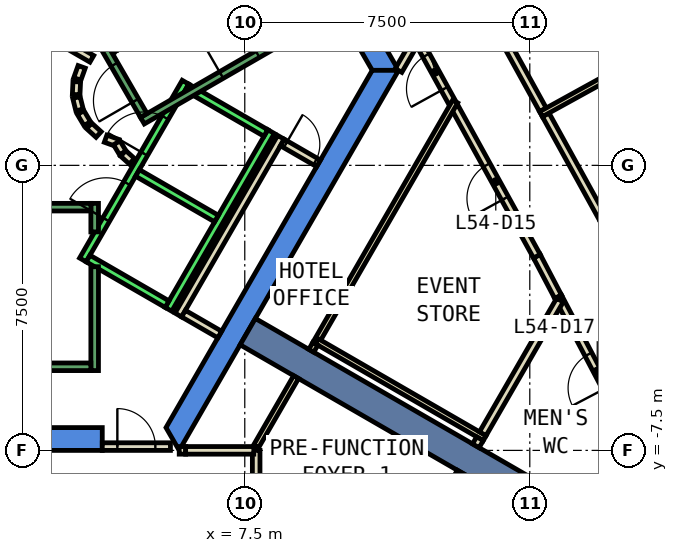
"""IFC4 building model, lengths in metres.
Left out: names, types, materials, properties, quantities, classifications, styles, units other than length and angle.
Written with IfcOpenShell. Run it as: python <this file> out.ifc"""

import sys

from ifc_helpers import new_model, si_unit, direction, frame, frame_2d, origin, place, context, subcontext, project, spatial, polyline, rectangle, outline, extrude, element, fill, save


model = new_model("IFC4")
c1 = context("Model", 3, precision=1e-05, world=origin(), true_north=direction((0.0, 1.0)))
c2 = subcontext(c1, "Body", "Model", "MODEL_VIEW")
j1 = project(units=[si_unit("LENGTHUNIT", "METRE"), si_unit("PLANEANGLEUNIT", "RADIAN")], contexts=[c1])
p1 = place(None, origin())
s1 = spatial("IfcSite", under=j1, at=p1, CompositionType="ELEMENT")
p2 = place(p1, origin())
s2 = spatial("IfcBuilding", under=s1, at=p2, CompositionType="ELEMENT")
p3 = place(p2, frame((0.0, 0.0, 241.4)))
s3 = spatial("IfcBuildingStorey", under=s2, at=p3, CompositionType="ELEMENT", Elevation=241.4)
p4 = place(p3, frame((0.0, 0.0, -0.6)))
e1 = element("IfcWall", 1, at=p4, inside=s3, PredefinedType="SHEAR", context=c2, shape_type="SweptSolid", body=[
    extrude(outline(polyline([(6.786, 10.747), (6.266, 10.447), (10.854, 2.5), (11.547, 2.5), (6.786, 10.747)])), origin(), (0.0, 0.0, 1.0), 3.86),
])
p5 = place(p3, frame((0.0, 0.0, -0.6)))
e2 = element("IfcWall", 2, at=p5, inside=s3, PredefinedType="SHEAR", context=c2, shape_type="SweptSolid", body=[
    extrude(outline(polyline([(3.75, -7.5), (3.75, -6.9), (-5.427, -6.9), (-5.774, -7.5), (3.75, -7.5)])), origin(), (0.0, 0.0, 1.0), 3.86),
])
p6 = place(p3, frame((0.0, 0.0, -0.6)))
e3 = element("IfcWall", 3, at=p6, inside=s3, PredefinedType="SHEAR", context=c2, shape_type="SweptSolid", body=[
    extrude(outline(polyline([(5.774, -7.5), (11.547, 2.5), (10.854, 2.5), (5.427, -6.9), (5.774, -7.5)])), origin(), (0.0, 0.0, 1.0), 3.86),
])
p7 = place(p3, frame((7.578, -4.375, -0.6), z_axis=(0.0, 0.0, 1.0), x_axis=(0.866024315419, -0.5000018851, 0.0)))
e4 = element("IfcWall", 4, at=p7, inside=s3, PredefinedType="SHEAR", context=c2, shape_type="SweptSolid", body=[
    extrude(rectangle(XDim=9.0, YDim=0.8, at=frame_2d((4.5, 0.0))), origin(), (0.0, 0.0, 1.0), 3.86),
])
p8 = place(p3, frame((12.952, 1.661, 0.0), z_axis=(0.0, 0.0, 1.0), x_axis=(-0.482707835392, 0.875781448566, 0.0)))
e5 = element("IfcWall", 5, at=p8, inside=s3, PredefinedType="PARTITIONING", context=c2, shape_type="SweptSolid", body=[
    extrude(rectangle(XDim=1.817, YDim=0.2, at=frame_2d((0.908, 0.0))), origin(), (0.0, 0.0, 1.0), 3.26),
])
p9 = place(p8, frame((0.408, 0.0, 0.0)))
e6 = element("IfcOpeningElement", 6, at=p9, cuts=e5, PredefinedType="OPENING", context=c2, shape_type="SweptSolid", body=[
    extrude(rectangle(XDim=1.0, YDim=2.1, at=frame_2d((0.5, 1.05))), frame((0.0, 0.11, 0.0), z_axis=(0.0, -1.0, 0.0), x_axis=(1.0, 0.0, 0.0)), (0.0, 0.0, 1.0), 0.22),
])
p10 = place(p3, frame((12.079, 3.419, 0.0), z_axis=(0.0, 0.0, 1.0), x_axis=(-0.500674759037, -0.865635480825, 0.0)))
e7 = element("IfcWall", 7, at=p10, inside=s3, PredefinedType="PARTITIONING", context=c2, shape_type="SweptSolid", body=[
    extrude(rectangle(XDim=1.065, YDim=0.2, at=frame_2d((0.532, 0.0))), origin(), (0.0, 0.0, 1.0), 3.26),
])
p11 = place(p3, frame((15.746, -3.458, 0.0), z_axis=(0.0, 0.0, 1.0), x_axis=(-0.464794189951, 0.885418748948, 0.0)))
e8 = element("IfcWall", 8, at=p11, inside=s3, PredefinedType="PARTITIONING", context=c2, shape_type="SweptSolid", body=[
    extrude(rectangle(XDim=1.205, YDim=0.2, at=frame_2d((0.603, 0.0))), origin(), (0.0, 0.0, 1.0), 3.26),
])
p12 = place(p3, frame((15.186, -2.391, 0.0), z_axis=(0.0, 0.0, 1.0), x_axis=(-0.482858240592, 0.875698532311, 0.0)))
e9 = element("IfcWall", 9, at=p12, inside=s3, PredefinedType="PARTITIONING", context=c2, shape_type="SweptSolid", body=[
    extrude(rectangle(XDim=4.478, YDim=0.2, at=frame_2d((2.239, 0.0))), origin(), (0.0, 0.0, 1.0), 3.26),
])
p13 = place(p12, frame((1.739, 0.0, 0.0)))
e10 = element("IfcOpeningElement", 10, at=p13, cuts=e9, PredefinedType="OPENING", context=c2, shape_type="SweptSolid", body=[
    extrude(rectangle(XDim=1.0, YDim=2.1, at=frame_2d((0.5, 1.05))), frame((0.0, 0.11, 0.0), z_axis=(0.0, -1.0, 0.0), x_axis=(1.0, 0.0, 0.0)), (0.0, 0.0, 1.0), 0.22),
])
p14 = place(p3, frame((17.804, -7.374, 0.0), z_axis=(0.0, 0.0, 1.0), x_axis=(-0.465179971699, 0.885216128372, 0.0)))
e11 = element("IfcWall", 11, at=p14, inside=s3, PredefinedType="PARTITIONING", context=c2, shape_type="SweptSolid", body=[
    extrude(rectangle(XDim=4.424, YDim=0.2, at=frame_2d((2.212, 0.0))), origin(), (0.0, 0.0, 1.0), 3.26),
])
p15 = place(p14, frame((1.712, 0.0, 0.0)))
e12 = element("IfcOpeningElement", 12, at=p15, cuts=e11, PredefinedType="OPENING", context=c2, shape_type="SweptSolid", body=[
    extrude(rectangle(XDim=1.0, YDim=2.1, at=frame_2d((0.5, 1.05))), frame((0.0, 0.11, 0.0), z_axis=(0.0, -1.0, 0.0), x_axis=(1.0, 0.0, 0.0)), (0.0, 0.0, 1.0), 0.22),
])
p16 = place(p3, frame((15.418, 1.33, 0.0), z_axis=(0.0, 0.0, 1.0), x_axis=(0.482838875149, -0.875709210095, 0.0)))
e13 = element("IfcWall", 13, at=p16, inside=s3, PredefinedType="PARTITIONING", context=c2, shape_type="SweptSolid", body=[
    extrude(rectangle(XDim=3.167, YDim=0.2, at=frame_2d((1.583, 0.0))), origin(), (0.0, 0.0, 1.0), 3.26),
])
p17 = place(p3, frame((13.817, 4.234, 0.0), z_axis=(0.0, 0.0, 1.0), x_axis=(0.482871474341, -0.875691235121, 0.0)))
e14 = element("IfcWall", 14, at=p17, inside=s3, PredefinedType="PARTITIONING", context=c2, shape_type="SweptSolid", body=[
    extrude(rectangle(XDim=3.167, YDim=0.2, at=frame_2d((1.583, 0.0))), origin(), (0.0, 0.0, 1.0), 3.26),
])
p18 = place(p3, frame((5.751, -3.938, 0.0), z_axis=(0.0, 0.0, 1.0), x_axis=(0.500034260056, 0.866005622828, 0.0)))
e15 = element("IfcWall", 15, at=p18, inside=s3, PredefinedType="PARTITIONING", context=c2, shape_type="SweptSolid", body=[
    extrude(rectangle(XDim=5.399, YDim=0.2, at=frame_2d((2.7, 0.0))), origin(), (0.0, 0.0, 1.0), 3.26),
])
p19 = place(p3, frame((8.488, 0.602, 0.0), z_axis=(0.0, 0.0, 1.0), x_axis=(0.866063652425, -0.499933745558, 0.0)))
e16 = element("IfcWall", 16, at=p19, inside=s3, PredefinedType="PARTITIONING", context=c2, shape_type="SweptSolid", body=[
    extrude(rectangle(XDim=1.1, YDim=0.2, at=frame_2d((0.55, 0.0))), origin(), (0.0, 0.0, 1.0), 3.26),
])
p20 = place(p19, frame((0.1, 0.0, 0.0)))
e17 = element("IfcOpeningElement", 17, at=p20, cuts=e16, PredefinedType="OPENING", context=c2, shape_type="SweptSolid", body=[
    extrude(rectangle(XDim=0.9, YDim=2.1, at=frame_2d((0.45, 1.05))), frame((0.0, 0.11, 0.0), z_axis=(0.0, -1.0, 0.0), x_axis=(1.0, 0.0, 0.0)), (0.0, 0.0, 1.0), 0.22),
])
p21 = place(p3, frame((6.841, -4.452, 0.0), z_axis=(0.0, 0.0, 1.0), x_axis=(-0.86621513555, 0.499671230855, 0.0)))
e18 = element("IfcWall", 18, at=p21, inside=s3, PredefinedType="PARTITIONING", context=c2, shape_type="SweptSolid", body=[
    extrude(rectangle(XDim=1.1, YDim=0.2, at=frame_2d((0.55, 0.0))), origin(), (0.0, 0.0, 1.0), 3.26),
])
p22 = place(p3, frame((5.775, -7.499, 0.0), z_axis=(0.0, 0.0, 1.0), x_axis=(1.0, 0.0, 0.0)))
e19 = element("IfcWall", 19, at=p22, inside=s3, PredefinedType="PARTITIONING", context=c2, shape_type="SweptSolid", body=[
    extrude(rectangle(XDim=0.169, YDim=0.2, at=frame_2d((0.084, 0.0))), origin(), (0.0, 0.0, 1.0), 2.4),
])
p23 = place(p3, frame((7.8, -7.39, 0.0), z_axis=(0.0, 0.0, 1.0), x_axis=(0.499977374825, 0.866038466041, 0.0)))
e20 = element("IfcWall", 20, at=p23, inside=s3, PredefinedType="PARTITIONING", context=c2, shape_type="SweptSolid", body=[
    extrude(rectangle(XDim=2.1, YDim=0.15, at=frame_2d((1.05, 0.0))), origin(), (0.0, 0.0, 1.0), 3.26),
])
p24 = place(p3, frame((9.358, -4.692, 0.0), z_axis=(0.0, 0.0, 1.0), x_axis=(0.500027777314, 0.866009365951, 0.0)))
e21 = element("IfcWall", 21, at=p24, inside=s3, PredefinedType="PARTITIONING", context=c2, shape_type="SweptSolid", body=[
    extrude(rectangle(XDim=7.36, YDim=0.15, at=frame_2d((3.68, 0.0))), origin(), (0.0, 0.0, 1.0), 3.26),
])
p25 = place(p3, frame((1.866, 3.732, 0.0), z_axis=(0.0, 0.0, 1.0), x_axis=(0.866043361281, -0.499968895414, 0.0)))
e22 = element("IfcWall", 22, at=p25, inside=s3, PredefinedType="PARTITIONING", context=c2, shape_type="SweptSolid", body=[
    extrude(rectangle(XDim=1.858, YDim=0.2, at=frame_2d((0.929, 0.0))), origin(), (0.0, 0.0, 1.0), 3.26),
])
p26 = place(p3, frame((3.208, 2.592, 0.0), z_axis=(0.0, 0.0, 1.0), x_axis=(-0.337388820924, -0.941365382578, 0.0)))
e23 = element("IfcWall", 23, at=p26, inside=s3, PredefinedType="PARTITIONING", context=c2, shape_type="SweptSolid", body=[
    extrude(rectangle(XDim=0.338, YDim=0.2, at=frame_2d((0.169, 0.0))), origin(), (0.0, 0.0, 1.0), 3.26),
])
p27 = place(p3, frame((3.079, 2.199, 0.0), z_axis=(0.0, 0.0, 1.0), x_axis=(-0.047771483479, -0.998858290933, 0.0)))
e24 = element("IfcWall", 24, at=p27, inside=s3, PredefinedType="PARTITIONING", context=c2, shape_type="SweptSolid", body=[
    extrude(rectangle(XDim=0.337, YDim=0.2, at=frame_2d((0.169, 0.0))), origin(), (0.0, 0.0, 1.0), 3.26),
])
p28 = place(p3, frame((3.07, 1.786, 0.0), z_axis=(0.0, 0.0, 1.0), x_axis=(0.242705583207, -0.970099994784, 0.0)))
e25 = element("IfcWall", 25, at=p28, inside=s3, PredefinedType="PARTITIONING", context=c2, shape_type="SweptSolid", body=[
    extrude(rectangle(XDim=0.338, YDim=0.2, at=frame_2d((0.169, 0.0))), origin(), (0.0, 0.0, 1.0), 3.26),
])
for number, where, z_axis, x_axis in (
    (26, (3.182, 1.388, 0.0), (0.0, 0.0, 1.0), (0.512, -0.859, 0.0)),
    (27, (3.404, 1.039, 0.0), (0.0, 0.0, 1.0), (0.74, -0.672, 0.0)),
):
    element("IfcWall", number, at=place(p3, frame(where, z_axis=z_axis, x_axis=x_axis)), inside=s3, PredefinedType="PARTITIONING", context=c2, shape_type="SweptSolid", body=[
        extrude(rectangle(XDim=0.338, YDim=0.2, at=frame_2d((0.169, 0.0))), origin(), (0.0, 0.0, 1.0), 3.26),
    ])
p29 = place(p3, frame((3.838, 0.702, 0.0), z_axis=(0.0, 0.0, 1.0), x_axis=(0.941035081519, -0.338308993895, 0.0)))
e28 = element("IfcWall", 28, at=p29, inside=s3, PredefinedType="PARTITIONING", context=c2, shape_type="SweptSolid", body=[
    extrude(rectangle(XDim=0.337, YDim=0.2, at=frame_2d((0.168, 0.0))), origin(), (0.0, 0.0, 1.0), 3.26),
])
p30 = place(p3, frame((4.132, 0.593, 0.0), z_axis=(0.0, 0.0, 1.0), x_axis=(0.513561617048, -0.858052717201, 0.0)))
e29 = element("IfcWall", 29, at=p30, inside=s3, PredefinedType="PARTITIONING", context=c2, shape_type="SweptSolid", body=[
    extrude(rectangle(XDim=0.308, YDim=0.2, at=frame_2d((0.154, 0.0))), origin(), (0.0, 0.0, 1.0), 3.26),
])
p31 = place(p3, frame((4.301, 0.315, 0.0), z_axis=(0.0, 0.0, 1.0), x_axis=(0.741798017506, -0.670623367639, 0.0)))
e30 = element("IfcWall", 30, at=p31, inside=s3, PredefinedType="PARTITIONING", context=c2, shape_type="SweptSolid", body=[
    extrude(rectangle(XDim=0.309, YDim=0.2, at=frame_2d((0.154, 0.0))), origin(), (0.0, 0.0, 1.0), 3.26),
])
p32 = place(p3, frame((7.8, -7.499, 0.0), z_axis=(0.0, 0.0, 1.0), x_axis=(0.0, -1.0, 0.0)))
e31 = element("IfcWall", 31, at=p32, inside=s3, PredefinedType="PARTITIONING", context=c2, shape_type="SweptSolid", body=[
    extrude(rectangle(XDim=4.604, YDim=0.2, at=frame_2d((2.302, 0.0))), origin(), (0.0, 0.0, 1.0), 3.26),
])
p33 = place(p32, frame((1.802, 0.0, 0.0)))
e32 = element("IfcOpeningElement", 32, at=p33, cuts=e31, PredefinedType="OPENING", context=c2, shape_type="SweptSolid", body=[
    extrude(rectangle(XDim=1.0, YDim=2.1, at=frame_2d((0.5, 1.05))), frame((0.0, 0.11, 0.0), z_axis=(0.0, -1.0, 0.0), x_axis=(1.0, 0.0, 0.0)), (0.0, 0.0, 1.0), 0.22),
])
p34 = place(p3, frame((9.395, -4.627, 0.0), z_axis=(0.0, 0.0, 1.0), x_axis=(0.866034131428, -0.499984882974, 0.0)))
e33 = element("IfcWall", 33, at=p34, inside=s3, PredefinedType="PARTITIONING", context=c2, shape_type="SweptSolid", body=[
    extrude(rectangle(XDim=5.1, YDim=0.15, at=frame_2d((2.55, 0.0))), origin(), (0.0, 0.0, 1.0), 3.26),
])
p35 = place(p3, frame((13.18, -8.071, 0.0), z_axis=(0.0, 0.0, 1.0), x_axis=(-0.499914724673, -0.86607463192, 0.0)))
e34 = element("IfcWall", 34, at=p35, inside=s3, PredefinedType="PARTITIONING", context=c2, shape_type="SweptSolid", body=[
    extrude(rectangle(XDim=4.507, YDim=0.2, at=frame_2d((2.253, 0.0))), origin(), (0.0, 0.0, 1.0), 3.26),
])
p36 = place(p3, frame((13.688, -7.192, 0.0), z_axis=(0.0, 0.0, 1.0), x_axis=(-0.499787711288, -0.866147934042, 0.0)))
e35 = element("IfcWall", 35, at=p36, inside=s3, PredefinedType="PARTITIONING", context=c2, shape_type="SweptSolid", body=[
    extrude(rectangle(XDim=0.216, YDim=0.2, at=frame_2d((0.108, 0.0))), origin(), (0.0, 0.0, 1.0), 3.26),
])
p37 = place(p3, frame((15.793, -3.546, 0.0), z_axis=(0.0, 0.0, 1.0), x_axis=(-0.500000064182, -0.866025366729, 0.0)))
e36 = element("IfcWall", 36, at=p37, inside=s3, PredefinedType="PARTITIONING", context=c2, shape_type="SweptSolid", body=[
    extrude(rectangle(XDim=4.06, YDim=0.2, at=frame_2d((2.03, 0.0))), origin(), (0.0, 0.0, 1.0), 3.26),
])
p38 = place(p3, frame((15.295, 1.347, 0.0), z_axis=(0.0, 0.0, 1.0), x_axis=(0.875728645362, 0.482803624358, 0.0)))
e37 = element("IfcWall", 37, at=p38, inside=s3, PredefinedType="PARTITIONING", context=c2, shape_type="SweptSolid", body=[
    extrude(rectangle(XDim=5.4, YDim=0.15, at=frame_2d((2.7, 0.0))), origin(), (0.0, 0.0, 1.0), 3.26),
])
p39 = place(p3, frame((3.75, -7.4, 0.0), z_axis=(0.0, 0.0, 1.0), x_axis=(1.0, 0.0, 0.0)))
e38 = element("IfcWall", 38, at=p39, inside=s3, PredefinedType="PARTITIONING", context=c2, shape_type="SweptSolid", body=[
    extrude(rectangle(XDim=1.794, YDim=0.2, at=frame_2d((0.897, 0.0))), origin(), (0.0, 0.0, 1.0), 2.4),
])
p40 = place(p39, frame((0.397, 0.0, 0.0)))
e39 = element("IfcOpeningElement", 39, at=p40, cuts=e38, PredefinedType="OPENING", context=c2, shape_type="SweptSolid", body=[
    extrude(rectangle(XDim=1.0, YDim=2.1, at=frame_2d((0.5, 1.05))), frame((0.0, 0.11, 0.0), z_axis=(0.0, -1.0, 0.0), x_axis=(1.0, 0.0, 0.0)), (0.0, 0.0, 1.0), 0.22),
])
p41 = place(p3, frame((9.25, -4.879, 0.0), z_axis=(0.0, 0.0, 1.0), x_axis=(0.499787711288, 0.866147934042, 0.0)))
e40 = element("IfcWall", 40, at=p41, inside=s3, PredefinedType="PARTITIONING", context=c2, shape_type="SweptSolid", body=[
    extrude(rectangle(XDim=0.216, YDim=0.15, at=frame_2d((0.108, 0.0))), origin(), (0.0, 0.0, 1.0), 3.26),
])
p42 = place(p3, frame((5.944, -7.499, 0.0), z_axis=(0.0, 0.0, 1.0), x_axis=(1.0, 0.0, 0.0)))
e41 = element("IfcWall", 41, at=p42, inside=s3, PredefinedType="PARTITIONING", context=c2, shape_type="SweptSolid", body=[
    extrude(rectangle(XDim=1.793, YDim=0.2, at=frame_2d((0.896, 0.0))), origin(), (0.0, 0.0, 1.0), 3.26),
])
p43 = place(p3, frame((3.24, -2.488, 0.0), z_axis=(0.0, 0.0, 1.0), x_axis=(0.500034260056, 0.866005622828, 0.0)))
e42 = element("IfcWall", 42, at=p43, inside=s3, PredefinedType="STANDARD", context=c2, shape_type="SweptSolid", body=[
    extrude(rectangle(XDim=5.399, YDim=0.2, at=frame_2d((2.7, 0.0))), origin(), (0.0, 0.0, 1.0), 3.26),
])
p44 = place(p43, frame((3.225, 0.0, 0.0)))
e43 = element("IfcOpeningElement", 43, at=p44, cuts=e42, PredefinedType="OPENING", context=c2, shape_type="SweptSolid", body=[
    extrude(rectangle(XDim=1.1, YDim=2.1, at=frame_2d((0.55, 1.05))), frame((0.0, 0.11, 0.0), z_axis=(0.0, -1.0, 0.0), x_axis=(1.0, 0.0, 0.0)), (0.0, 0.0, 1.0), 0.22),
])
p45 = place(p43, frame((1.225, 0.0, 0.0)))
e44 = element("IfcOpeningElement", 44, at=p45, cuts=e42, PredefinedType="OPENING", context=c2, shape_type="SweptSolid", body=[
    extrude(rectangle(XDim=1.1, YDim=2.1, at=frame_2d((0.55, 1.05))), frame((0.0, 0.11, 0.0), z_axis=(0.0, -1.0, 0.0), x_axis=(1.0, 0.0, 0.0)), (0.0, 0.0, 1.0), 0.22),
])
p46 = place(p3, frame((5.492, -3.788, 0.0), z_axis=(0.0, 0.0, 1.0), x_axis=(0.500034260056, 0.866005622828, 0.0)))
e45 = element("IfcWall", 45, at=p46, inside=s3, PredefinedType="STANDARD", context=c2, shape_type="SweptSolid", body=[
    extrude(rectangle(XDim=5.399, YDim=0.2, at=frame_2d((2.7, 0.0))), origin(), (0.0, 0.0, 1.0), 3.26),
])
p47 = place(p3, frame((3.377, -2.452, 0.0), z_axis=(0.0, 0.0, 1.0), x_axis=(0.865955154139, -0.50012165622, 0.0)))
e46 = element("IfcWall", 46, at=p47, inside=s3, PredefinedType="STANDARD", context=c2, shape_type="SweptSolid", body=[
    extrude(rectangle(XDim=2.4, YDim=0.2, at=frame_2d((1.2, 0.0))), origin(), (0.0, 0.0, 1.0), 3.26),
])
for number, where, z_axis, x_axis in (
    (47, (4.677, -0.2, 0.0), (0.0, 0.0, 1.0), (0.866, -0.5, 0.0)),
    (48, (5.977, 2.052, 0.0), (0.0, 0.0, 1.0), (0.866, -0.5, 0.0)),
):
    element("IfcWall", number, at=place(p3, frame(where, z_axis=z_axis, x_axis=x_axis)), inside=s3, PredefinedType="STANDARD", context=c2, shape_type="SweptSolid", body=[
        extrude(rectangle(XDim=2.399, YDim=0.2, at=frame_2d((1.2, 0.0))), origin(), (0.0, 0.0, 1.0), 3.26),
    ])
p48 = place(p3, frame((3.55, -2.667, 0.0), z_axis=(0.0, 0.0, 1.0), x_axis=(0.0, -1.0, 0.0)))
e49 = element("IfcWall", 49, at=p48, inside=s3, PredefinedType="STANDARD", context=c2, shape_type="SweptSolid", body=[
    extrude(rectangle(XDim=2.733, YDim=0.2, at=frame_2d((1.366, 0.0))), origin(), (0.0, 0.0, 1.0), 3.26),
])
p49 = place(p3, frame((3.55, -1.0, 0.0), z_axis=(0.0, 0.0, 1.0), x_axis=(0.0, -1.0, 0.0)))
e50 = element("IfcWall", 50, at=p49, inside=s3, PredefinedType="STANDARD", context=c2, shape_type="SweptSolid", body=[
    extrude(rectangle(XDim=0.751, YDim=0.2, at=frame_2d((0.375, 0.0))), origin(), (0.0, 0.0, 1.0), 3.26),
])
p50 = place(p3, frame((-3.45, -1.1, 0.0), z_axis=(0.0, 0.0, 1.0), x_axis=(1.0, 0.0, 0.0)))
e51 = element("IfcWall", 51, at=p50, inside=s3, PredefinedType="STANDARD", context=c2, shape_type="SweptSolid", body=[
    extrude(rectangle(XDim=6.9, YDim=0.2, at=frame_2d((3.45, 0.0))), origin(), (0.0, 0.0, 1.0), 3.26),
])
p51 = place(p50, frame((0.45, 0.0, 0.0)))
e52 = element("IfcOpeningElement", 52, at=p51, cuts=e51, PredefinedType="OPENING", context=c2, shape_type="SweptSolid", body=[
    extrude(rectangle(XDim=1.1, YDim=2.2, at=frame_2d((0.55, 1.1))), frame((0.0, 0.11, 0.0), z_axis=(0.0, -1.0, 0.0), x_axis=(1.0, 0.0, 0.0)), (0.0, 0.0, 1.0), 0.22),
])
p52 = place(p3, frame((-3.45, -5.3, 0.0), z_axis=(0.0, 0.0, 1.0), x_axis=(1.0, 0.0, 0.0)))
e53 = element("IfcWall", 53, at=p52, inside=s3, PredefinedType="STANDARD", context=c2, shape_type="SweptSolid", body=[
    extrude(rectangle(XDim=6.9, YDim=0.2, at=frame_2d((3.45, 0.0))), origin(), (0.0, 0.0, 1.0), 3.26),
])
p53 = place(p3, frame((4.806, 1.176, 0.0), z_axis=(0.0, 0.0, 1.0), x_axis=(0.866059941101, 0.499940174841, 0.0)))
e54 = element("IfcWall", 54, at=p53, inside=s3, PredefinedType="STANDARD", context=c2, shape_type="SweptSolid", body=[
    extrude(rectangle(XDim=4.4, YDim=0.2, at=frame_2d((2.2, 0.0))), origin(), (0.0, 0.0, 1.0), 3.26),
])
p54 = place(p53, frame((2.4, 0.0, 0.0)))
e55 = element("IfcOpeningElement", 55, at=p54, cuts=e54, PredefinedType="OPENING", context=c2, shape_type="SweptSolid", body=[
    extrude(rectangle(XDim=1.1, YDim=2.2, at=frame_2d((0.55, 1.1))), frame((0.0, 0.11, 0.0), z_axis=(0.0, -1.0, 0.0), x_axis=(1.0, 0.0, 0.0)), (0.0, 0.0, 1.0), 0.22),
])
p55 = place(p3, frame((4.843, 1.312, 0.0), z_axis=(0.0, 0.0, 1.0), x_axis=(-0.499963383562, 0.866046543262, 0.0)))
e56 = element("IfcWall", 56, at=p55, inside=s3, PredefinedType="STANDARD", context=c2, shape_type="SweptSolid", body=[
    extrude(rectangle(XDim=6.9, YDim=0.2, at=frame_2d((3.45, 0.0))), origin(), (0.0, 0.0, 1.0), 3.26),
])
p56 = place(p55, frame((0.45, 0.0, 0.0)))
e57 = element("IfcOpeningElement", 57, at=p56, cuts=e56, PredefinedType="OPENING", context=c2, shape_type="SweptSolid", body=[
    extrude(rectangle(XDim=1.1, YDim=2.2, at=frame_2d((0.55, 1.1))), frame((0.0, 0.11, 0.0), z_axis=(0.0, -1.0, 0.0), x_axis=(1.0, 0.0, 0.0)), (0.0, 0.0, 1.0), 0.22),
])
p57 = place(p13, origin())
e58 = element("IfcDoor", 58, at=p57, inside=s3, OperationType="SINGLE_SWING_LEFT", PredefinedType="DOOR", context=c2, shape_type="SweptSolid", body=[
    extrude(rectangle(XDim=1.0, YDim=2.1, at=frame_2d((0.5, 1.05))), frame((0.0, 0.025, 0.0), z_axis=(0.0, -1.0, 0.0), x_axis=(1.0, 0.0, 0.0)), (0.0, 0.0, 1.0), 0.05),
])
fill(e10, e58)
p58 = place(p15, origin())
e59 = element("IfcDoor", 59, at=p58, inside=s3, OperationType="SINGLE_SWING_LEFT", PredefinedType="DOOR", context=c2, shape_type="SweptSolid", body=[
    extrude(rectangle(XDim=1.0, YDim=2.1, at=frame_2d((0.5, 1.05))), frame((0.0, 0.025, 0.0), z_axis=(0.0, -1.0, 0.0), x_axis=(1.0, 0.0, 0.0)), (0.0, 0.0, 1.0), 0.05),
])
fill(e12, e59)
p59 = place(p9, origin())
e60 = element("IfcDoor", 60, at=p59, inside=s3, OperationType="SINGLE_SWING_RIGHT", PredefinedType="DOOR", context=c2, shape_type="SweptSolid", body=[
    extrude(rectangle(XDim=1.0, YDim=2.1, at=frame_2d((0.5, 1.05))), frame((0.0, 0.025, 0.0), z_axis=(0.0, -1.0, 0.0), x_axis=(1.0, 0.0, 0.0)), (0.0, 0.0, 1.0), 0.05),
])
fill(e6, e60)
p60 = place(p20, origin())
e61 = element("IfcDoor", 61, at=p60, inside=s3, OperationType="SINGLE_SWING_RIGHT", PredefinedType="DOOR", context=c2, shape_type="SweptSolid", body=[
    extrude(rectangle(XDim=0.9, YDim=2.1, at=frame_2d((0.45, 1.05))), frame((0.0, 0.025, 0.0), z_axis=(0.0, -1.0, 0.0), x_axis=(1.0, 0.0, 0.0)), (0.0, 0.0, 1.0), 0.05),
])
fill(e17, e61)
p61 = place(p40, origin())
e62 = element("IfcDoor", 62, at=p61, inside=s3, OperationType="SINGLE_SWING_LEFT", PredefinedType="DOOR", context=c2, shape_type="SweptSolid", body=[
    extrude(rectangle(XDim=1.0, YDim=2.1, at=frame_2d((0.5, 1.05))), frame((0.0, 0.025, 0.0), z_axis=(0.0, -1.0, 0.0), x_axis=(1.0, 0.0, 0.0)), (0.0, 0.0, 1.0), 0.05),
])
fill(e39, e62)
p62 = place(p44, origin())
e63 = element("IfcDoor", 63, at=p62, inside=s3, OperationType="SLIDING_TO_LEFT", PredefinedType="DOOR", context=c2, shape_type="SweptSolid", body=[
    extrude(rectangle(XDim=1.1, YDim=2.1, at=frame_2d((0.55, 1.05))), frame((0.0, 0.025, 0.0), z_axis=(0.0, -1.0, 0.0), x_axis=(1.0, 0.0, 0.0)), (0.0, 0.0, 1.0), 0.05),
])
fill(e43, e63)
p63 = place(p45, origin())
e64 = element("IfcDoor", 64, at=p63, inside=s3, OperationType="SLIDING_TO_LEFT", PredefinedType="DOOR", context=c2, shape_type="SweptSolid", body=[
    extrude(rectangle(XDim=1.1, YDim=2.1, at=frame_2d((0.55, 1.05))), frame((0.0, 0.025, 0.0), z_axis=(0.0, -1.0, 0.0), x_axis=(1.0, 0.0, 0.0)), (0.0, 0.0, 1.0), 0.05),
])
fill(e44, e64)
p64 = place(p56, origin())
e65 = element("IfcDoor", 65, at=p64, inside=s3, OperationType="SINGLE_SWING_LEFT", PredefinedType="DOOR", context=c2, shape_type="SweptSolid", body=[
    extrude(rectangle(XDim=1.1, YDim=2.2, at=frame_2d((0.55, 1.1))), frame((0.0, 0.025, 0.0), z_axis=(0.0, -1.0, 0.0), x_axis=(1.0, 0.0, 0.0)), (0.0, 0.0, 1.0), 0.05),
])
fill(e57, e65)
p65 = place(p54, origin())
e66 = element("IfcDoor", 66, at=p65, inside=s3, OperationType="SINGLE_SWING_LEFT", PredefinedType="DOOR", context=c2, shape_type="SweptSolid", body=[
    extrude(rectangle(XDim=1.1, YDim=2.2, at=frame_2d((0.55, 1.1))), frame((0.0, 0.025, 0.0), z_axis=(0.0, -1.0, 0.0), x_axis=(1.0, 0.0, 0.0)), (0.0, 0.0, 1.0), 0.05),
])
fill(e55, e66)
save(model, sys.argv[1])
